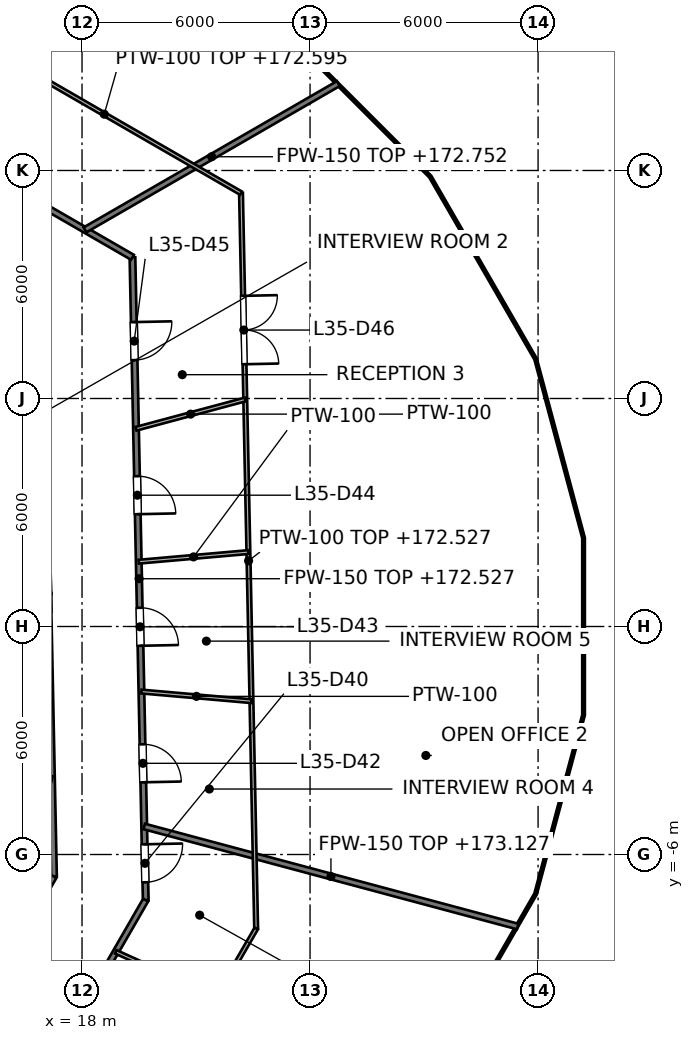
"""IFC4 building model, lengths in metres.
Left out: names, types, materials, properties, quantities, classifications, styles, units other than length and angle.
Written with IfcOpenShell. Run it as: python <this file> out.ifc"""

import sys

from ifc_helpers import new_model, si_unit, direction, frame, frame_2d, origin, place, context, subcontext, project, spatial, rectangle, extrude, element, fill, save


model = new_model("IFC4")
c1 = context("Model", 3, precision=1e-05, world=origin(), true_north=direction((0.0, 1.0)))
c2 = subcontext(c1, "Body", "Model", "MODEL_VIEW")
j1 = project(units=[si_unit("LENGTHUNIT", "METRE"), si_unit("PLANEANGLEUNIT", "RADIAN")], contexts=[c1])
p1 = place(None, origin())
s1 = spatial("IfcSite", under=j1, at=p1, CompositionType="ELEMENT")
p2 = place(p1, origin())
s2 = spatial("IfcBuilding", under=s1, at=p2, CompositionType="ELEMENT")
p3 = place(p2, frame((0.0, 0.0, 169.6)))
s3 = spatial("IfcBuildingStorey", under=s2, at=p3, CompositionType="ELEMENT", Elevation=169.6)
p4 = place(p3, frame((16.955, 8.314, 0.0), z_axis=(0.0, 0.0, 1.0), x_axis=(0.020631568882, -0.999787146529, 0.0)))
e1 = element("IfcWall", 1, at=p4, inside=s3, PredefinedType="PARTITIONING", context=c2, shape_type="SweptSolid", body=[
    extrude(rectangle(XDim=14.898, YDim=0.15, at=frame_2d((7.449, 0.0))), origin(), (0.0, 0.0, 1.0), 2.927),
])
p5 = place(p4, frame((6.949, 0.0, 0.0)))
e2 = element("IfcOpeningElement", 2, at=p5, cuts=e1, PredefinedType="OPENING", context=c2, shape_type="SweptSolid", body=[
    extrude(rectangle(XDim=1.0, YDim=2.1, at=frame_2d((0.5, 1.05))), frame((0.0, 0.075, 0.0), z_axis=(0.0, -1.0, 0.0), x_axis=(1.0, 0.0, 0.0)), (0.0, 0.0, 1.0), 0.15),
])
p6 = place(p4, frame((1.514, 0.0, 0.0)))
e3 = element("IfcOpeningElement", 3, at=p6, cuts=e1, PredefinedType="OPENING", context=c2, shape_type="SweptSolid", body=[
    extrude(rectangle(XDim=1.0, YDim=2.1, at=frame_2d((0.5, 1.05))), frame((0.0, 0.075, 0.0), z_axis=(0.0, -1.0, 0.0), x_axis=(1.0, 0.0, 0.0)), (0.0, 0.0, 1.0), 0.15),
])
p7 = place(p3, frame((19.327, 9.716, 0.0), z_axis=(0.0, 0.0, 1.0), x_axis=(0.020632909715, -0.999787118859, 0.0)))
e4 = element("IfcWall", 4, at=p7, inside=s3, PredefinedType="PARTITIONING", context=c2, shape_type="SweptSolid", body=[
    extrude(rectangle(XDim=16.921, YDim=0.15, at=frame_2d((8.46, 0.0))), origin(), (0.0, 0.0, 1.0), 2.927),
])
p8 = place(p7, frame((15.451, 0.0, 0.0)))
e5 = element("IfcOpeningElement", 5, at=p8, cuts=e4, PredefinedType="OPENING", context=c2, shape_type="SweptSolid", body=[
    extrude(rectangle(XDim=1.0, YDim=2.1, at=frame_2d((0.5, 1.05))), frame((0.0, 0.075, 0.0), z_axis=(0.0, -1.0, 0.0), x_axis=(1.0, 0.0, 0.0)), (0.0, 0.0, 1.0), 0.15),
])
p9 = place(p7, frame((12.819, 0.0, 0.0)))
e6 = element("IfcOpeningElement", 6, at=p9, cuts=e4, PredefinedType="OPENING", context=c2, shape_type="SweptSolid", body=[
    extrude(rectangle(XDim=1.0, YDim=2.1, at=frame_2d((0.5, 1.05))), frame((0.0, 0.075, 0.0), z_axis=(0.0, -1.0, 0.0), x_axis=(1.0, 0.0, 0.0)), (0.0, 0.0, 1.0), 0.15),
])
p10 = place(p7, frame((9.226, 0.0, 0.0)))
e7 = element("IfcOpeningElement", 7, at=p10, cuts=e4, PredefinedType="OPENING", context=c2, shape_type="SweptSolid", body=[
    extrude(rectangle(XDim=1.0, YDim=2.1, at=frame_2d((0.5, 1.05))), frame((0.0, 0.075, 0.0), z_axis=(0.0, -1.0, 0.0), x_axis=(1.0, 0.0, 0.0)), (0.0, 0.0, 1.0), 0.15),
])
p11 = place(p7, frame((5.762, 0.0, 0.0)))
e8 = element("IfcOpeningElement", 8, at=p11, cuts=e4, PredefinedType="OPENING", context=c2, shape_type="SweptSolid", body=[
    extrude(rectangle(XDim=1.0, YDim=2.1, at=frame_2d((0.5, 1.05))), frame((0.0, 0.075, 0.0), z_axis=(0.0, -1.0, 0.0), x_axis=(1.0, 0.0, 0.0)), (0.0, 0.0, 1.0), 0.15),
])
p12 = place(p7, frame((1.706, 0.0, 0.0)))
e9 = element("IfcOpeningElement", 9, at=p12, cuts=e4, PredefinedType="OPENING", context=c2, shape_type="SweptSolid", body=[
    extrude(rectangle(XDim=1.0, YDim=2.1, at=frame_2d((0.5, 1.05))), frame((0.0, 0.075, 0.0), z_axis=(0.0, -1.0, 0.0), x_axis=(1.0, 0.0, 0.0)), (0.0, 0.0, 1.0), 0.15),
])
p13 = place(p3, frame((14.225, 12.662, 0.0), z_axis=(0.0, 0.0, 1.0), x_axis=(0.865969566972, -0.500096699728, 0.0)))
e10 = element("IfcWall", 10, at=p13, inside=s3, PredefinedType="PARTITIONING", context=c2, shape_type="SweptSolid", body=[
    extrude(rectangle(XDim=5.891, YDim=0.15, at=frame_2d((2.946, 0.0))), origin(), (0.0, 0.0, 1.0), 2.995),
])
p14 = place(p3, frame((19.636, -5.262, 0.0), z_axis=(0.0, 0.0, 1.0), x_axis=(0.965927163809, -0.258814053357, 0.0)))
e11 = element("IfcWall", 11, at=p14, inside=s3, PredefinedType="PARTITIONING", context=c2, shape_type="SweptSolid", body=[
    extrude(rectangle(XDim=10.174, YDim=0.15, at=frame_2d((5.087, 0.0))), origin(), (0.0, 0.0, 1.0), 3.527),
])
p15 = place(p3, frame((18.078, 10.437, 0.0), z_axis=(0.0, 0.0, 1.0), x_axis=(0.865997546841, 0.500048246539, 0.0)))
e12 = element("IfcWall", 12, at=p15, inside=s3, PredefinedType="PARTITIONING", context=c2, shape_type="SweptSolid", body=[
    extrude(rectangle(XDim=7.698, YDim=0.15, at=frame_2d((3.849, 0.0))), origin(), (0.0, 0.0, 1.0), 3.152),
])
p16 = place(p3, frame((16.7, -12.355, 0.0), z_axis=(0.0, 0.0, 1.0), x_axis=(0.499651425435, 0.866226559891, 0.0)))
e13 = element("IfcWall", 13, at=p16, inside=s3, PredefinedType="PARTITIONING", context=c2, shape_type="SweptSolid", body=[
    extrude(rectangle(XDim=5.951, YDim=0.15, at=frame_2d((2.976, 0.0))), origin(), (0.0, 0.0, 1.0), 2.995),
])
p17 = place(p16, frame((1.786, 0.0, 0.0)))
e14 = element("IfcOpeningElement", 14, at=p17, cuts=e13, PredefinedType="OPENING", context=c2, shape_type="SweptSolid", body=[
    extrude(rectangle(XDim=1.0, YDim=2.1, at=frame_2d((0.5, 1.05))), frame((0.0, 0.075, 0.0), z_axis=(0.0, -1.0, 0.0), x_axis=(1.0, 0.0, 0.0)), (0.0, 0.0, 1.0), 0.15),
])
p18 = place(p3, frame((15.306, -9.969, 0.0), z_axis=(0.0, 0.0, 1.0), x_axis=(0.499690037699, 0.866204286658, 0.0)))
e15 = element("IfcWall", 15, at=p18, inside=s3, PredefinedType="PARTITIONING", context=c2, shape_type="SweptSolid", body=[
    extrude(rectangle(XDim=3.912, YDim=0.15, at=frame_2d((1.956, 0.0))), origin(), (0.0, 0.0, 1.0), 2.995),
])
p19 = place(p18, frame((1.513, 0.0, 0.0)))
e16 = element("IfcOpeningElement", 16, at=p19, cuts=e15, PredefinedType="OPENING", context=c2, shape_type="SweptSolid", body=[
    extrude(rectangle(XDim=1.0, YDim=2.1, at=frame_2d((0.5, 1.05))), frame((0.0, 0.075, 0.0), z_axis=(0.0, -1.0, 0.0), x_axis=(1.0, 0.0, 0.0)), (0.0, 0.0, 1.0), 0.15),
])
p20 = place(p3, frame((22.183, 11.404, 0.0), z_axis=(0.0, 0.0, 1.0), x_axis=(0.020584540725, -0.999788115894, 0.0)))
e17 = element("IfcWall", 17, at=p20, inside=s3, PredefinedType="PARTITIONING", context=c2, shape_type="SweptSolid", body=[
    extrude(rectangle(XDim=19.356, YDim=0.1, at=frame_2d((9.678, 0.0))), origin(), (0.0, 0.0, 1.0), 2.927),
])
p21 = place(p20, frame((2.704, 0.0, 0.0)))
e18 = element("IfcOpeningElement", 18, at=p21, cuts=e17, PredefinedType="OPENING", context=c2, shape_type="SweptSolid", body=[
    extrude(rectangle(XDim=1.8, YDim=2.1, at=frame_2d((0.9, 1.05))), frame((0.0, 0.05, 0.0), z_axis=(0.0, -1.0, 0.0), x_axis=(1.0, 0.0, 0.0)), (0.0, 0.0, 1.0), 0.1),
])
p22 = place(p3, frame((14.986, 15.56, 0.0), z_axis=(0.0, 0.0, 1.0), x_axis=(0.865930670747, -0.500164046549, 0.0)))
e19 = element("IfcWall", 19, at=p22, inside=s3, PredefinedType="PARTITIONING", context=c2, shape_type="SweptSolid", body=[
    extrude(rectangle(XDim=8.311, YDim=0.1, at=frame_2d((4.155, 0.0))), origin(), (0.0, 0.0, 1.0), 2.995),
])
p23 = place(p3, frame((18.89, -8.562, 0.0), z_axis=(0.0, 0.0, 1.0), x_axis=(0.910794966467, -0.412858969939, 0.0)))
e20 = element("IfcWall", 20, at=p23, inside=s3, PredefinedType="PARTITIONING", context=c2, shape_type="SweptSolid", body=[
    extrude(rectangle(XDim=2.904, YDim=0.1, at=frame_2d((1.452, 0.0))), origin(), (0.0, 0.0, 1.0), 3.85),
])
p24 = place(p3, frame((19.563, -1.712, 0.0), z_axis=(0.0, 0.0, 1.0), x_axis=(0.9962004602, -0.087089856452, 0.0)))
e21 = element("IfcWall", 21, at=p24, inside=s3, PredefinedType="PARTITIONING", context=c2, shape_type="SweptSolid", body=[
    extrude(rectangle(XDim=2.907, YDim=0.1, at=frame_2d((1.454, 0.0))), origin(), (0.0, 0.0, 1.0), 3.85),
])
p25 = place(p3, frame((19.492, 1.705, 0.0), z_axis=(0.0, 0.0, 1.0), x_axis=(0.996181541968, 0.087305987436, 0.0)))
e22 = element("IfcWall", 22, at=p25, inside=s3, PredefinedType="PARTITIONING", context=c2, shape_type="SweptSolid", body=[
    extrude(rectangle(XDim=2.897, YDim=0.1, at=frame_2d((1.448, 0.0))), origin(), (0.0, 0.0, 1.0), 3.85),
])
p26 = place(p3, frame((19.42, 5.203, 0.0), z_axis=(0.0, 0.0, 1.0), x_axis=(0.965851348081, 0.259096841762, 0.0)))
e23 = element("IfcWall", 23, at=p26, inside=s3, PredefinedType="PARTITIONING", context=c2, shape_type="SweptSolid", body=[
    extrude(rectangle(XDim=2.977, YDim=0.1, at=frame_2d((1.488, 0.0))), origin(), (0.0, 0.0, 1.0), 3.85),
])
p27 = place(p3, frame((18.378, -15.228, 0.0), z_axis=(0.0, 0.0, 1.0), x_axis=(0.50019921462, 0.865910356615, 0.0)))
e24 = element("IfcWall", 24, at=p27, inside=s3, PredefinedType="PARTITIONING", context=c2, shape_type="SweptSolid", body=[
    extrude(rectangle(XDim=8.407, YDim=0.1, at=frame_2d((4.203, 0.0))), origin(), (0.0, 0.0, 1.0), 2.995),
])
p28 = place(p8, origin())
e25 = element("IfcDoor", 25, at=p28, inside=s3, OperationType="SINGLE_SWING_LEFT", PredefinedType="DOOR", context=c2, shape_type="SweptSolid", body=[
    extrude(rectangle(XDim=1.0, YDim=2.1, at=frame_2d((0.5, 1.05))), frame((0.0, 0.025, 0.0), z_axis=(0.0, -1.0, 0.0), x_axis=(1.0, 0.0, 0.0)), (0.0, 0.0, 1.0), 0.05),
])
fill(e5, e25)
p29 = place(p9, origin())
e26 = element("IfcDoor", 26, at=p29, inside=s3, OperationType="SINGLE_SWING_RIGHT", PredefinedType="DOOR", context=c2, shape_type="SweptSolid", body=[
    extrude(rectangle(XDim=1.0, YDim=2.1, at=frame_2d((0.5, 1.05))), frame((0.0, 0.025, 0.0), z_axis=(0.0, -1.0, 0.0), x_axis=(1.0, 0.0, 0.0)), (0.0, 0.0, 1.0), 0.05),
])
fill(e6, e26)
p30 = place(p10, origin())
e27 = element("IfcDoor", 27, at=p30, inside=s3, OperationType="SINGLE_SWING_RIGHT", PredefinedType="DOOR", context=c2, shape_type="SweptSolid", body=[
    extrude(rectangle(XDim=1.0, YDim=2.1, at=frame_2d((0.5, 1.05))), frame((0.0, 0.025, 0.0), z_axis=(0.0, -1.0, 0.0), x_axis=(1.0, 0.0, 0.0)), (0.0, 0.0, 1.0), 0.05),
])
fill(e7, e27)
p31 = place(p11, origin())
e28 = element("IfcDoor", 28, at=p31, inside=s3, OperationType="SINGLE_SWING_RIGHT", PredefinedType="DOOR", context=c2, shape_type="SweptSolid", body=[
    extrude(rectangle(XDim=1.0, YDim=2.1, at=frame_2d((0.5, 1.05))), frame((0.0, 0.025, 0.0), z_axis=(0.0, -1.0, 0.0), x_axis=(1.0, 0.0, 0.0)), (0.0, 0.0, 1.0), 0.05),
])
fill(e8, e28)
p32 = place(p12, origin())
e29 = element("IfcDoor", 29, at=p32, inside=s3, OperationType="SINGLE_SWING_LEFT", PredefinedType="DOOR", context=c2, shape_type="SweptSolid", body=[
    extrude(rectangle(XDim=1.0, YDim=2.1, at=frame_2d((0.5, 1.05))), frame((0.0, 0.025, 0.0), z_axis=(0.0, -1.0, 0.0), x_axis=(1.0, 0.0, 0.0)), (0.0, 0.0, 1.0), 0.05),
])
fill(e9, e29)
p33 = place(p21, origin())
e30 = element("IfcDoor", 30, at=p33, inside=s3, OperationType="DOUBLE_DOOR_SINGLE_SWING", PredefinedType="DOOR", context=c2, shape_type="SweptSolid", body=[
    extrude(rectangle(XDim=1.8, YDim=2.1, at=frame_2d((0.9, 1.05))), frame((0.0, 0.025, 0.0), z_axis=(0.0, -1.0, 0.0), x_axis=(1.0, 0.0, 0.0)), (0.0, 0.0, 1.0), 0.05),
])
fill(e18, e30)
save(model, sys.argv[1])
